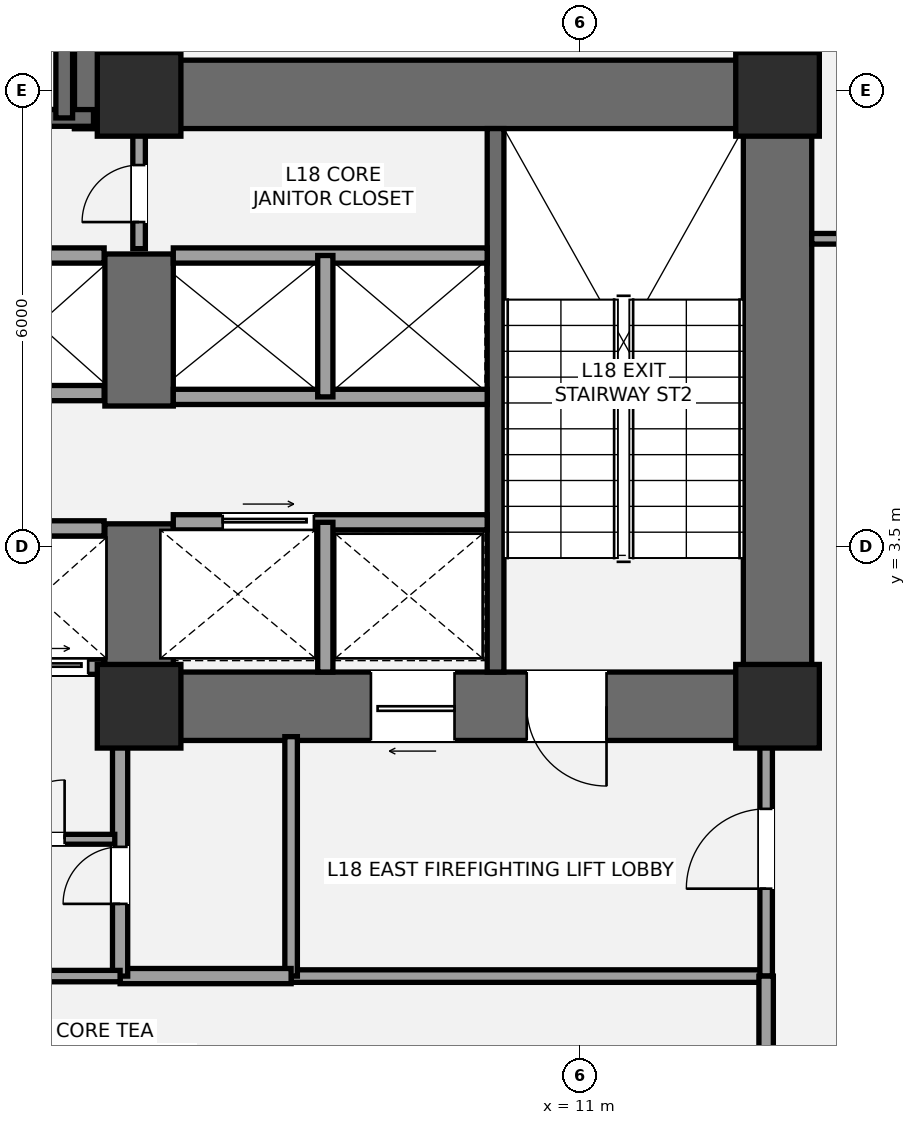
"""IFC4 building model, lengths in metres.
Left out: names, types, materials, properties, quantities, classifications, styles, units other than length and angle.
Written with IfcOpenShell. Run it as: python <this file> out.ifc"""

import sys

from ifc_helpers import new_model, si_unit, direction, frame, frame_2d, origin, origin_2d, place, context, subcontext, project, spatial, rectangle, extrude, element, fill, save


model = new_model("IFC4")
c1 = context("Model", 3, precision=1e-05, world=origin(), true_north=direction((0.0, 1.0)))
c2 = subcontext(c1, "Body", "Model", "MODEL_VIEW")
j1 = project(units=[si_unit("LENGTHUNIT", "METRE"), si_unit("PLANEANGLEUNIT", "RADIAN")], contexts=[c1])
p1 = place(None, origin())
s1 = spatial("IfcSite", under=j1, at=p1, CompositionType="ELEMENT")
p2 = place(p1, origin())
s2 = spatial("IfcBuilding", under=s1, at=p2, CompositionType="ELEMENT")
p3 = place(p2, frame((0.0, 0.0, 70.2)))
s3 = spatial("IfcBuildingStorey", under=s2, at=p3, CompositionType="ELEMENT", Elevation=70.2)
p4 = place(p3, frame((13.6, 0.95, 0.0), z_axis=(0.0, 0.0, 1.0), x_axis=(0.0, 1.0, 0.0)))
e1 = element("IfcWall", 1, at=p4, inside=s3, PredefinedType="SHEAR", context=c2, shape_type="SweptSolid", body=[
    extrude(rectangle(XDim=8.95, YDim=0.9, at=frame_2d((4.475, 0.0))), origin(), (0.0, 0.0, 1.0), 3.6),
])
p5 = place(p3, frame((4.35, 9.45, 0.0), z_axis=(0.0, 0.0, 1.0), x_axis=(1.0, 0.0, 0.0)))
e2 = element("IfcWall", 2, at=p5, inside=s3, PredefinedType="SHEAR", context=c2, shape_type="SweptSolid", body=[
    extrude(rectangle(XDim=9.7, YDim=0.9, at=frame_2d((4.85, 0.0))), origin(), (0.0, 0.0, 1.0), 3.6),
])
p6 = place(p3, frame((14.05, 1.4, 0.0), z_axis=(0.0, 0.0, 1.0), x_axis=(-1.0, 0.0, 0.0)))
e3 = element("IfcWall", 3, at=p6, inside=s3, PredefinedType="SHEAR", context=c2, shape_type="SweptSolid", body=[
    extrude(rectangle(XDim=9.3, YDim=0.9, at=frame_2d((4.65, 0.0))), origin(), (0.0, 0.0, 1.0), 3.6),
])
p7 = place(p6, frame((2.7, 0.0, 0.0)))
e4 = element("IfcOpeningElement", 4, at=p7, cuts=e3, PredefinedType="OPENING", context=c2, shape_type="SweptSolid", body=[
    extrude(rectangle(XDim=1.05, YDim=2.15, at=frame_2d((0.525, 1.075))), frame((0.0, 0.46, 0.0), z_axis=(0.0, -1.0, 0.0), x_axis=(1.0, 0.0, 0.0)), (0.0, 0.0, 1.0), 0.92),
])
p8 = place(p6, frame((4.7, 0.0, 0.0)))
e5 = element("IfcOpeningElement", 5, at=p8, cuts=e3, PredefinedType="OPENING", context=c2, shape_type="SweptSolid", body=[
    extrude(rectangle(XDim=1.1, YDim=2.2, at=frame_2d((0.55, 1.1))), frame((0.0, 0.46, 0.0), z_axis=(0.0, -1.0, 0.0), x_axis=(1.0, 0.0, 0.0)), (0.0, 0.0, 1.0), 0.92),
])
p9 = place(p3, frame((5.2, 0.95, 0.0), z_axis=(0.0, 0.0, 1.0), x_axis=(0.0, 1.0, 0.0)))
e6 = element("IfcWall", 6, at=p9, inside=s3, PredefinedType="SHEAR", context=c2, shape_type="SweptSolid", body=[
    extrude(rectangle(XDim=2.85, YDim=0.9, at=frame_2d((1.425, 0.0))), origin(), (0.0, 0.0, 1.0), 3.6),
])
p10 = place(p3, frame((5.2, 5.35, 0.0), z_axis=(0.0, 0.0, 1.0), x_axis=(0.0, 1.0, 0.0)))
e7 = element("IfcWall", 7, at=p10, inside=s3, PredefinedType="SHEAR", context=c2, shape_type="SweptSolid", body=[
    extrude(rectangle(XDim=2.0, YDim=0.9, at=frame_2d((1.0, 0.0))), origin(), (0.0, 0.0, 1.0), 3.6),
])
p11 = place(p3, frame((9.89, 1.85, 0.0), z_axis=(0.0, 0.0, 1.0), x_axis=(0.0, 1.0, 0.0)))
e8 = element("IfcWall", 8, at=p11, inside=s3, PredefinedType="SHEAR", context=c2, shape_type="SweptSolid", body=[
    extrude(rectangle(XDim=7.15, YDim=0.22, at=frame_2d((3.575, 0.0))), origin(), (0.0, 0.0, 1.0), 3.6),
])
p12 = place(p3, frame((4.8, 9.0, 0.0), z_axis=(0.0, 0.0, 1.0), x_axis=(0.0, 1.0, 0.0)))
e9 = element("IfcWall", 9, at=p12, inside=s3, PredefinedType="SHEAR", context=c2, shape_type="SweptSolid", body=[
    extrude(rectangle(XDim=4.3, YDim=0.9, at=frame_2d((2.15, 0.0))), origin(), (0.0, 0.0, 1.0), 3.6),
])
p13 = place(p3, frame((-4.7, 9.14, 0.0), z_axis=(0.0, 0.0, 1.0), x_axis=(1.0, 0.0, 0.0)))
e10 = element("IfcWall", 10, at=p13, inside=s3, PredefinedType="SHEAR", context=c2, shape_type="SweptSolid", body=[
    extrude(rectangle(XDim=9.3, YDim=0.22, at=frame_2d((4.65, 0.0))), origin(), (0.0, 0.0, 1.0), 3.6),
])
p14 = place(p13, frame((1.15, 0.0, 0.0)))
e11 = element("IfcOpeningElement", 11, at=p14, cuts=e10, PredefinedType="OPENING", context=c2, shape_type="SweptSolid", body=[
    extrude(rectangle(XDim=1.05, YDim=2.15, at=frame_2d((0.525, 1.075))), frame((0.0, 0.12, 0.0), z_axis=(0.0, -1.0, 0.0), x_axis=(1.0, 0.0, 0.0)), (0.0, 0.0, 1.0), 0.24),
])
p15 = place(p3, frame((4.215, 9.14, 0.0), z_axis=(0.0, 0.0, 1.0), x_axis=(0.0, 1.0, 0.0)))
e12 = element("IfcWall", 12, at=p15, inside=s3, PredefinedType="SHEAR", context=c2, shape_type="SweptSolid", body=[
    extrude(rectangle(XDim=3.26, YDim=0.22, at=frame_2d((1.63, 0.0))), origin(), (0.0, 0.0, 1.0), 3.6),
])
for number, where, z_axis, x_axis in (
    (13, (5.2, 1.4, 0.0), (0.0, 0.0, 1.0), (1.0, 0.0, 0.0)),
    (14, (5.2, 9.45, 0.0), (0.0, 0.0, 1.0), (1.0, 0.0, 0.0)),
    (15, (13.6, 1.4, 0.0), (0.0, 0.0, 1.0), (1.0, 0.0, 0.0)),
    (16, (13.6, 9.45, 0.0), (0.0, 0.0, 1.0), (1.0, 0.0, 0.0)),
):
    element("IfcColumn", number, at=place(p3, frame(where, z_axis=z_axis, x_axis=x_axis)), inside=s3, PredefinedType="COLUMN", context=c2, shape_type="SweptSolid", body=[
        extrude(rectangle(XDim=1.1, YDim=1.1, at=origin_2d()), origin(), (0.0, 0.0, 1.0), 3.6),
    ])
p16 = place(p3, frame((7.2, -2.15, 0.0), z_axis=(0.0, 0.0, 1.0), x_axis=(1.0, 0.0, 0.0)))
e17 = element("IfcWall", 17, at=p16, inside=s3, PredefinedType="PARTITIONING", context=c2, shape_type="SweptSolid", body=[
    extrude(rectangle(XDim=6.25, YDim=0.165, at=frame_2d((3.125, 0.0))), origin(), (0.0, 0.0, 1.0), 3.4),
])
p17 = place(p3, frame((7.2, -2.15, 0.0), z_axis=(0.0, 0.0, 1.0), x_axis=(0.0, 1.0, 0.0)))
e18 = element("IfcWall", 18, at=p17, inside=s3, PredefinedType="PARTITIONING", context=c2, shape_type="SweptSolid", body=[
    extrude(rectangle(XDim=3.15, YDim=0.165, at=frame_2d((1.575, 0.0))), origin(), (0.0, 0.0, 1.0), 2.853),
])
p18 = place(p3, frame((13.45, -2.15, 0.0), z_axis=(0.0, 0.0, 1.0), x_axis=(0.0, 1.0, 0.0)))
e19 = element("IfcWall", 19, at=p18, inside=s3, PredefinedType="PARTITIONING", context=c2, shape_type="SweptSolid", body=[
    extrude(rectangle(XDim=3.15, YDim=0.165, at=frame_2d((1.575, 0.0))), origin(), (0.0, 0.0, 1.0), 2.853),
])
p19 = place(p18, frame((1.15, 0.0, 0.0)))
e20 = element("IfcOpeningElement", 20, at=p19, cuts=e19, PredefinedType="OPENING", context=c2, shape_type="SweptSolid", body=[
    extrude(rectangle(XDim=1.05, YDim=2.15, at=frame_2d((0.525, 1.075))), frame((0.0, 0.093, 0.0), z_axis=(0.0, -1.0, 0.0), x_axis=(1.0, 0.0, 0.0)), (0.0, 0.0, 1.0), 0.185),
])
p20 = place(p3, frame((4.95, -2.15, 0.0), z_axis=(0.0, 0.0, 1.0), x_axis=(1.0, 0.0, 0.0)))
e21 = element("IfcWall", 21, at=p20, inside=s3, PredefinedType="SOLIDWALL", context=c2, shape_type="SweptSolid", body=[
    extrude(rectangle(XDim=2.25, YDim=0.2, at=frame_2d((1.125, 0.0))), origin(), (0.0, 0.0, 1.0), 3.4),
])
p21 = place(p3, frame((4.95, -2.15, 0.0), z_axis=(0.0, 0.0, 1.0), x_axis=(0.0, 1.0, 0.0)))
e22 = element("IfcWall", 22, at=p21, inside=s3, PredefinedType="SOLIDWALL", context=c2, shape_type="SweptSolid", body=[
    extrude(rectangle(XDim=3.15, YDim=0.2, at=frame_2d((1.575, 0.0))), origin(), (0.0, 0.0, 1.0), 2.853),
])
p22 = place(p21, frame((0.95, 0.0, 0.0)))
e23 = element("IfcOpeningElement", 23, at=p22, cuts=e22, PredefinedType="OPENING", context=c2, shape_type="SweptSolid", body=[
    extrude(rectangle(XDim=0.75, YDim=2.1, at=frame_2d((0.375, 1.05))), frame((0.0, 0.11, 0.0), z_axis=(0.0, -1.0, 0.0), x_axis=(1.0, 0.0, 0.0)), (0.0, 0.0, 1.0), 0.22),
])
p23 = place(p3, frame((2.89, -0.35, 0.0), z_axis=(0.0, 0.0, 1.0), x_axis=(1.0, 0.0, 0.0)))
e24 = element("IfcWall", 24, at=p23, inside=s3, PredefinedType="PARTITIONING", context=c2, shape_type="SweptSolid", body=[
    extrude(rectangle(XDim=1.99, YDim=0.13, at=frame_2d((0.995, 0.0))), origin(), (0.0, 0.0, 1.0), 3.4),
])
p24 = place(p23, frame((0.55, 0.0, 0.0)))
e25 = element("IfcOpeningElement", 25, at=p24, cuts=e24, PredefinedType="OPENING", context=c2, shape_type="SweptSolid", body=[
    extrude(rectangle(XDim=0.78, YDim=2.1, at=frame_2d((0.39, 1.05))), frame((0.0, 0.075, 0.0), z_axis=(0.0, -1.0, 0.0), x_axis=(1.0, 0.0, 0.0)), (0.0, 0.0, 1.0), 0.15),
])
p25 = place(p3, frame((5.65, 3.82, 0.0), z_axis=(0.0, 0.0, 1.0), x_axis=(1.0, 0.0, 0.0)))
e26 = element("IfcWall", 26, at=p25, inside=s3, PredefinedType="SOLIDWALL", context=c2, shape_type="SweptSolid", body=[
    extrude(rectangle(XDim=4.13, YDim=0.2, at=frame_2d((2.065, 0.0))), origin(), (0.0, 0.0, 1.0), 3.4),
])
p26 = place(p25, frame((0.65, 0.0, 0.0)))
e27 = element("IfcOpeningElement", 27, at=p26, cuts=e26, PredefinedType="OPENING", context=c2, shape_type="SweptSolid", body=[
    extrude(rectangle(XDim=1.2, YDim=2.2, at=frame_2d((0.6, 1.1))), frame((0.0, 0.11, 0.0), z_axis=(0.0, -1.0, 0.0), x_axis=(1.0, 0.0, 0.0)), (0.0, 0.0, 1.0), 0.22),
])
p27 = place(p3, frame((7.65, 1.85, 0.0), z_axis=(0.0, 0.0, 1.0), x_axis=(0.0, 1.0, 0.0)))
e28 = element("IfcWall", 28, at=p27, inside=s3, PredefinedType="SOLIDWALL", context=c2, shape_type="SweptSolid", body=[
    extrude(rectangle(XDim=1.97, YDim=0.2, at=frame_2d((0.985, 0.0))), origin(), (0.0, 0.0, 1.0), 3.4),
])
for number, where, z_axis, x_axis in (
    (29, (5.65, 5.47, 0.0), (0.0, 0.0, 1.0), (1.0, 0.0, 0.0)),
    (30, (5.65, 7.33, 0.0), (0.0, 0.0, 1.0), (1.0, 0.0, 0.0)),
):
    element("IfcWall", number, at=place(p3, frame(where, z_axis=z_axis, x_axis=x_axis)), inside=s3, PredefinedType="SOLIDWALL", context=c2, shape_type="SweptSolid", body=[
        extrude(rectangle(XDim=4.13, YDim=0.2, at=frame_2d((2.065, 0.0))), origin(), (0.0, 0.0, 1.0), 3.4),
    ])
p28 = place(p3, frame((7.65, 5.47, 0.0), z_axis=(0.0, 0.0, 1.0), x_axis=(0.0, 1.0, 0.0)))
e31 = element("IfcWall", 31, at=p28, inside=s3, PredefinedType="SOLIDWALL", context=c2, shape_type="SweptSolid", body=[
    extrude(rectangle(XDim=1.86, YDim=0.2, at=frame_2d((0.93, 0.0))), origin(), (0.0, 0.0, 1.0), 3.4),
])
p29 = place(p3, frame((0.88, 1.92, 0.0), z_axis=(0.0, 0.0, 1.0), x_axis=(1.0, 0.0, 0.0)))
e32 = element("IfcWall", 32, at=p29, inside=s3, PredefinedType="SOLIDWALL", context=c2, shape_type="SweptSolid", body=[
    extrude(rectangle(XDim=3.86, YDim=0.2, at=frame_2d((1.93, 0.0))), origin(), (0.0, 0.0, 1.0), 2.39),
])
p30 = place(p29, frame((0.55, 0.0, 0.0)))
e33 = element("IfcOpeningElement", 33, at=p30, cuts=e32, PredefinedType="OPENING", context=c2, shape_type="SweptSolid", body=[
    extrude(rectangle(XDim=1.1, YDim=2.2, at=frame_2d((0.55, 1.1))), frame((0.0, 0.11, 0.0), z_axis=(0.0, -1.0, 0.0), x_axis=(1.0, 0.0, 0.0)), (0.0, 0.0, 1.0), 0.22),
])
p31 = place(p29, frame((2.55, 0.0, 0.0)))
e34 = element("IfcOpeningElement", 34, at=p31, cuts=e32, PredefinedType="OPENING", context=c2, shape_type="SweptSolid", body=[
    extrude(rectangle(XDim=1.1, YDim=2.2, at=frame_2d((0.55, 1.1))), frame((0.0, 0.11, 0.0), z_axis=(0.0, -1.0, 0.0), x_axis=(1.0, 0.0, 0.0)), (0.0, 0.0, 1.0), 0.22),
])
for number, where, z_axis, x_axis in (
    (35, (0.88, 3.74, 0.0), (0.0, 0.0, 1.0), (1.0, 0.0, 0.0)),
    (36, (0.88, 5.52, 0.0), (0.0, 0.0, 1.0), (1.0, 0.0, 0.0)),
    (37, (0.88, 7.33, 0.0), (0.0, 0.0, 1.0), (1.0, 0.0, 0.0)),
):
    element("IfcWall", number, at=place(p3, frame(where, z_axis=z_axis, x_axis=x_axis)), inside=s3, PredefinedType="SOLIDWALL", context=c2, shape_type="SweptSolid", body=[
        extrude(rectangle(XDim=3.86, YDim=0.2, at=frame_2d((1.93, 0.0))), origin(), (0.0, 0.0, 1.0), 3.4),
    ])
p32 = place(p3, frame((5.2, 7.42, 0.0), z_axis=(0.0, 0.0, 1.0), x_axis=(0.0, 1.0, 0.0)))
e38 = element("IfcWall", 38, at=p32, inside=s3, PredefinedType="PARTITIONING", context=c2, shape_type="SweptSolid", body=[
    extrude(rectangle(XDim=1.58, YDim=0.165, at=frame_2d((0.79, 0.0))), origin(), (0.0, 0.0, 1.0), 3.4),
])
p33 = place(p32, frame((0.35, 0.0, 0.0)))
e39 = element("IfcOpeningElement", 39, at=p33, cuts=e38, PredefinedType="OPENING", context=c2, shape_type="SweptSolid", body=[
    extrude(rectangle(XDim=0.75, YDim=2.1, at=frame_2d((0.375, 1.05))), frame((0.0, 0.093, 0.0), z_axis=(0.0, -1.0, 0.0), x_axis=(1.0, 0.0, 0.0)), (0.0, 0.0, 1.0), 0.185),
])
p34 = place(p3, frame((2.1, -2.15, 0.0), z_axis=(0.0, 0.0, 1.0), x_axis=(1.0, 0.0, 0.0)))
e40 = element("IfcWall", 40, at=p34, inside=s3, PredefinedType="PLUMBINGWALL", context=c2, shape_type="SweptSolid", body=[
    extrude(rectangle(XDim=2.85, YDim=0.15, at=frame_2d((1.425, 0.0))), origin(), (0.0, 0.0, 1.0), 3.4),
])
p35 = place(p3, frame((13.45, -4.05, 0.0), z_axis=(0.0, 0.0, 1.0), x_axis=(0.0, 1.0, 0.0)))
e41 = element("IfcWall", 41, at=p35, inside=s3, PredefinedType="PLUMBINGWALL", context=c2, shape_type="SweptSolid", body=[
    extrude(rectangle(XDim=1.9, YDim=0.19, at=frame_2d((0.95, 0.0))), origin(), (0.0, 0.0, 1.0), 2.853),
])
p36 = place(p3, frame((14.05, 7.55, 0.0), z_axis=(0.0, 0.0, 1.0), x_axis=(1.0, 0.0, 0.0)))
e42 = element("IfcWall", 42, at=p36, inside=s3, PredefinedType="PARTITIONING", context=c2, shape_type="SweptSolid", body=[
    extrude(rectangle(XDim=12.184, YDim=0.14, at=frame_2d((6.092, 0.0))), origin(), (0.0, 0.0, 1.0), 2.853),
])
p37 = place(p36, frame((1.2, 0.0, 0.0)))
e43 = element("IfcOpeningElement", 43, at=p37, cuts=e42, PredefinedType="OPENING", context=c2, shape_type="SweptSolid", body=[
    extrude(rectangle(XDim=0.92, YDim=2.15, at=frame_2d((0.46, 1.075))), frame((0.0, 0.08, 0.0), z_axis=(0.0, -1.0, 0.0), x_axis=(1.0, 0.0, 0.0)), (0.0, 0.0, 1.0), 0.16),
])
p38 = place(p7, origin())
e44 = element("IfcDoor", 44, at=p38, inside=s3, OperationType="SINGLE_SWING_LEFT", PredefinedType="DOOR", context=c2, shape_type="SweptSolid", body=[
    extrude(rectangle(XDim=1.05, YDim=2.15, at=frame_2d((0.525, 1.075))), frame((0.0, 0.025, 0.0), z_axis=(0.0, -1.0, 0.0), x_axis=(1.0, 0.0, 0.0)), (0.0, 0.0, 1.0), 0.05),
])
fill(e4, e44)
p39 = place(p19, origin())
e45 = element("IfcDoor", 45, at=p39, inside=s3, OperationType="SINGLE_SWING_LEFT", PredefinedType="DOOR", context=c2, shape_type="SweptSolid", body=[
    extrude(rectangle(XDim=1.05, YDim=2.15, at=frame_2d((0.525, 1.075))), frame((0.0, 0.025, 0.0), z_axis=(0.0, -1.0, 0.0), x_axis=(1.0, 0.0, 0.0)), (0.0, 0.0, 1.0), 0.05),
])
fill(e20, e45)
p40 = place(p22, origin())
e46 = element("IfcDoor", 46, at=p40, inside=s3, OperationType="SINGLE_SWING_LEFT", PredefinedType="DOOR", context=c2, shape_type="SweptSolid", body=[
    extrude(rectangle(XDim=0.75, YDim=2.1, at=frame_2d((0.375, 1.05))), frame((0.0, 0.025, 0.0), z_axis=(0.0, -1.0, 0.0), x_axis=(1.0, 0.0, 0.0)), (0.0, 0.0, 1.0), 0.05),
])
fill(e23, e46)
p41 = place(p24, origin())
e47 = element("IfcDoor", 47, at=p41, inside=s3, OperationType="SINGLE_SWING_RIGHT", PredefinedType="DOOR", context=c2, shape_type="SweptSolid", body=[
    extrude(rectangle(XDim=0.78, YDim=2.1, at=frame_2d((0.39, 1.05))), frame((0.0, 0.025, 0.0), z_axis=(0.0, -1.0, 0.0), x_axis=(1.0, 0.0, 0.0)), (0.0, 0.0, 1.0), 0.05),
])
fill(e25, e47)
p42 = place(p8, origin())
e48 = element("IfcDoor", 48, at=p42, inside=s3, OperationType="SLIDING_TO_LEFT", PredefinedType="DOOR", context=c2, shape_type="SweptSolid", body=[
    extrude(rectangle(XDim=1.1, YDim=2.2, at=frame_2d((0.55, 1.1))), frame((0.0, 0.025, 0.0), z_axis=(0.0, -1.0, 0.0), x_axis=(1.0, 0.0, 0.0)), (0.0, 0.0, 1.0), 0.05),
])
fill(e5, e48)
p43 = place(p26, origin())
e49 = element("IfcDoor", 49, at=p43, inside=s3, OperationType="SLIDING_TO_RIGHT", PredefinedType="DOOR", context=c2, shape_type="SweptSolid", body=[
    extrude(rectangle(XDim=1.2, YDim=2.2, at=frame_2d((0.6, 1.1))), frame((0.0, 0.025, 0.0), z_axis=(0.0, -1.0, 0.0), x_axis=(1.0, 0.0, 0.0)), (0.0, 0.0, 1.0), 0.05),
])
fill(e27, e49)
p44 = place(p31, origin())
e50 = element("IfcDoor", 50, at=p44, inside=s3, OperationType="SLIDING_TO_LEFT", PredefinedType="DOOR", context=c2, shape_type="SweptSolid", body=[
    extrude(rectangle(XDim=1.1, YDim=2.2, at=frame_2d((0.55, 1.1))), frame((0.0, 0.025, 0.0), z_axis=(0.0, -1.0, 0.0), x_axis=(1.0, 0.0, 0.0)), (0.0, 0.0, 1.0), 0.05),
])
fill(e34, e50)
p45 = place(p33, origin())
e51 = element("IfcDoor", 51, at=p45, inside=s3, OperationType="SINGLE_SWING_LEFT", PredefinedType="DOOR", context=c2, shape_type="SweptSolid", body=[
    extrude(rectangle(XDim=0.75, YDim=2.1, at=frame_2d((0.375, 1.05))), frame((0.0, 0.025, 0.0), z_axis=(0.0, -1.0, 0.0), x_axis=(1.0, 0.0, 0.0)), (0.0, 0.0, 1.0), 0.05),
])
fill(e39, e51)
save(model, sys.argv[1])
